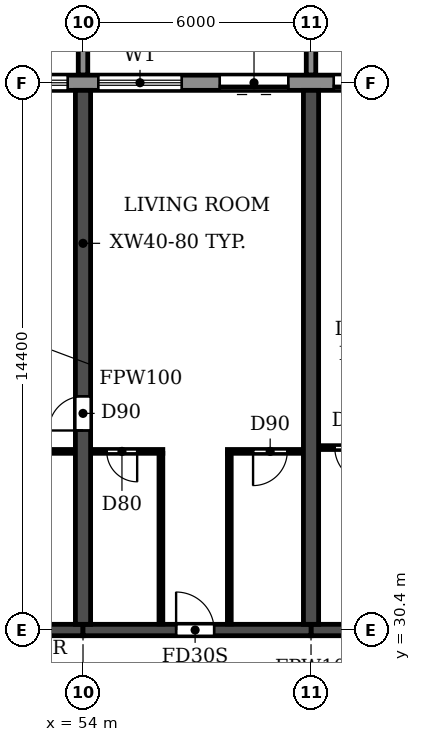
"""IFC4 building model, lengths in metres.
Left out: names, types, materials, properties, quantities, classifications, styles, units other than length and angle.
Written with IfcOpenShell. Run it as: python <this file> out.ifc"""

import sys

from ifc_helpers import new_model, si_unit, direction, frame, frame_2d, origin, place, context, subcontext, project, spatial, polyline, rectangle, outline, extrude, source, transform, mapped, element, fill, save


model = new_model("IFC4")
c1 = context("Model", 3, precision=1e-05, world=origin(), true_north=direction((0.0, 1.0)))
c2 = subcontext(c1, "Body", "Model", "MODEL_VIEW")
j1 = project(units=[si_unit("LENGTHUNIT", "METRE"), si_unit("PLANEANGLEUNIT", "RADIAN")], contexts=[c1])
p1 = place(None, origin())
s1 = spatial("IfcSite", under=j1, at=p1, CompositionType="ELEMENT")
p2 = place(p1, origin())
s2 = spatial("IfcBuilding", under=s1, at=p2, CompositionType="ELEMENT")
p3 = place(p2, frame((0.0, 0.0, 63.0)))
s3 = spatial("IfcBuildingStorey", under=s2, at=p3, CompositionType="ELEMENT", Elevation=63.0)
p4 = place(p3, frame((54.0, 30.55, 0.0), z_axis=(0.0, 0.0, 1.0), x_axis=(0.0, 1.0, 0.0)))
e1 = element("IfcWall", 1, at=p4, inside=s3, PredefinedType="SHEAR", context=c2, shape_type="SweptSolid", body=[
    extrude(rectangle(XDim=14.05, YDim=0.4, at=frame_2d((7.025, 0.0))), origin(), (0.0, 0.0, 1.0), 2.95),
])
p5 = place(p4, frame((5.1, 0.0, 0.0)))
e2 = element("IfcOpeningElement", 2, at=p5, cuts=e1, PredefinedType="OPENING", context=c2, shape_type="SweptSolid", body=[
    extrude(rectangle(XDim=0.9, YDim=2.1, at=frame_2d((0.45, 1.05))), frame((0.0, 0.21, 0.0), z_axis=(0.0, -1.0, 0.0), x_axis=(1.0, 0.0, 0.0)), (0.0, 0.0, 1.0), 0.42),
])
p6 = place(p3, frame((60.0, 30.55, 0.0), z_axis=(0.0, 0.0, 1.0), x_axis=(0.0, 1.0, 0.0)))
e3 = element("IfcWall", 3, at=p6, inside=s3, PredefinedType="SHEAR", context=c2, shape_type="SweptSolid", body=[
    extrude(rectangle(XDim=14.05, YDim=0.4, at=frame_2d((7.025, 0.0))), origin(), (0.0, 0.0, 1.0), 2.95),
])
p7 = place(p3, frame((48.0, 30.4, 0.0), z_axis=(0.0, 0.0, 1.0), x_axis=(1.0, 0.0, 0.0)))
e4 = element("IfcWall", 4, at=p7, inside=s3, PredefinedType="SHEAR", context=c2, shape_type="SweptSolid", body=[
    extrude(rectangle(XDim=6.0, YDim=0.3, at=frame_2d((3.0, 0.0))), origin(), (0.0, 0.0, 1.0), 2.35),
])
p8 = place(p3, frame((54.0, 30.4, 0.0), z_axis=(0.0, 0.0, 1.0), x_axis=(1.0, 0.0, 0.0)))
e5 = element("IfcWall", 5, at=p8, inside=s3, PredefinedType="SHEAR", context=c2, shape_type="SweptSolid", body=[
    extrude(rectangle(XDim=6.0, YDim=0.3, at=frame_2d((3.0, 0.0))), origin(), (0.0, 0.0, 1.0), 2.35),
])
p9 = place(p8, frame((2.45, 0.0, 0.0)))
e6 = element("IfcOpeningElement", 6, at=p9, cuts=e5, PredefinedType="OPENING", context=c2, shape_type="SweptSolid", body=[
    extrude(rectangle(XDim=1.0, YDim=2.1, at=frame_2d((0.5, 1.05))), frame((0.0, 0.16, 0.0), z_axis=(0.0, -1.0, 0.0), x_axis=(1.0, 0.0, 0.0)), (0.0, 0.0, 1.0), 0.32),
])
p10 = place(p3, frame((60.0, 30.4, 0.0), z_axis=(0.0, 0.0, 1.0), x_axis=(1.0, 0.0, 0.0)))
e7 = element("IfcWall", 7, at=p10, inside=s3, PredefinedType="SHEAR", context=c2, shape_type="SweptSolid", body=[
    extrude(rectangle(XDim=6.0, YDim=0.3, at=frame_2d((3.0, 0.0))), origin(), (0.0, 0.0, 1.0), 2.35),
])
p11 = place(p10, frame((2.55, 0.0, 0.0)))
e8 = element("IfcOpeningElement", 8, at=p11, cuts=e7, PredefinedType="OPENING", context=c2, shape_type="SweptSolid", body=[
    extrude(rectangle(XDim=1.0, YDim=2.1, at=frame_2d((0.5, 1.05))), frame((0.0, 0.16, 0.0), z_axis=(0.0, -1.0, 0.0), x_axis=(1.0, 0.0, 0.0)), (0.0, 0.0, 1.0), 0.32),
])
p12 = place(p3, frame((91.317, 44.8, 0.0), z_axis=(0.0, 0.0, 1.0), x_axis=(-1.0, 0.0, 0.0)))
e9 = element("IfcWall", 9, at=p12, inside=s3, PredefinedType="STANDARD", context=c2, shape_type="SweptSolid", body=[
    extrude(rectangle(XDim=80.634, YDim=0.4, at=frame_2d((40.317, 0.0))), origin(), (0.0, 0.0, 1.0), 2.95),
])
p13 = place(p12, frame((76.717, 0.0, 0.9)))
e10 = element("IfcOpeningElement", 10, at=p13, cuts=e9, PredefinedType="OPENING", context=c2, shape_type="SweptSolid", body=[
    extrude(rectangle(XDim=2.2, YDim=1.5, at=frame_2d((1.1, 0.75))), frame((0.0, 0.21, 0.0), z_axis=(0.0, -1.0, 0.0), x_axis=(1.0, 0.0, 0.0)), (0.0, 0.0, 1.0), 0.42),
])
p14 = place(p12, frame((73.917, 0.0, 0.0)))
e11 = element("IfcOpeningElement", 11, at=p14, cuts=e9, PredefinedType="OPENING", context=c2, shape_type="SweptSolid", body=[
    extrude(rectangle(XDim=1.8, YDim=2.4, at=frame_2d((0.9, 1.2))), frame((0.0, 0.21, 0.0), z_axis=(0.0, -1.0, 0.0), x_axis=(1.0, 0.0, 0.0)), (0.0, 0.0, 1.0), 0.42),
])
p15 = place(p12, frame((70.717, 0.0, 0.9)))
e12 = element("IfcOpeningElement", 12, at=p15, cuts=e9, PredefinedType="OPENING", context=c2, shape_type="SweptSolid", body=[
    extrude(rectangle(XDim=2.2, YDim=1.5, at=frame_2d((1.1, 0.75))), frame((0.0, 0.21, 0.0), z_axis=(0.0, -1.0, 0.0), x_axis=(1.0, 0.0, 0.0)), (0.0, 0.0, 1.0), 0.42),
])
p16 = place(p12, frame((67.917, 0.0, 0.0)))
e13 = element("IfcOpeningElement", 13, at=p16, cuts=e9, PredefinedType="OPENING", context=c2, shape_type="SweptSolid", body=[
    extrude(rectangle(XDim=1.8, YDim=2.4, at=frame_2d((0.9, 1.2))), frame((0.0, 0.21, 0.0), z_axis=(0.0, -1.0, 0.0), x_axis=(1.0, 0.0, 0.0)), (0.0, 0.0, 1.0), 0.42),
])
p17 = place(p12, frame((64.717, 0.0, 0.9)))
e14 = element("IfcOpeningElement", 14, at=p17, cuts=e9, PredefinedType="OPENING", context=c2, shape_type="SweptSolid", body=[
    extrude(rectangle(XDim=2.2, YDim=1.5, at=frame_2d((1.1, 0.75))), frame((0.0, 0.21, 0.0), z_axis=(0.0, -1.0, 0.0), x_axis=(1.0, 0.0, 0.0)), (0.0, 0.0, 1.0), 0.42),
])
p18 = place(p12, frame((61.917, 0.0, 0.0)))
e15 = element("IfcOpeningElement", 15, at=p18, cuts=e9, PredefinedType="OPENING", context=c2, shape_type="SweptSolid", body=[
    extrude(rectangle(XDim=1.8, YDim=2.4, at=frame_2d((0.9, 1.2))), frame((0.0, 0.21, 0.0), z_axis=(0.0, -1.0, 0.0), x_axis=(1.0, 0.0, 0.0)), (0.0, 0.0, 1.0), 0.42),
])
p19 = place(p12, frame((58.717, 0.0, 0.9)))
e16 = element("IfcOpeningElement", 16, at=p19, cuts=e9, PredefinedType="OPENING", context=c2, shape_type="SweptSolid", body=[
    extrude(rectangle(XDim=2.2, YDim=1.5, at=frame_2d((1.1, 0.75))), frame((0.0, 0.21, 0.0), z_axis=(0.0, -1.0, 0.0), x_axis=(1.0, 0.0, 0.0)), (0.0, 0.0, 1.0), 0.42),
])
p20 = place(p12, frame((55.717, 0.0, 0.9)))
e17 = element("IfcOpeningElement", 17, at=p20, cuts=e9, PredefinedType="OPENING", context=c2, shape_type="SweptSolid", body=[
    extrude(rectangle(XDim=2.2, YDim=1.5, at=frame_2d((1.1, 0.75))), frame((0.0, 0.21, 0.0), z_axis=(0.0, -1.0, 0.0), x_axis=(1.0, 0.0, 0.0)), (0.0, 0.0, 1.0), 0.42),
])
p21 = place(p12, frame((52.917, 0.0, 0.0)))
e18 = element("IfcOpeningElement", 18, at=p21, cuts=e9, PredefinedType="OPENING", context=c2, shape_type="SweptSolid", body=[
    extrude(rectangle(XDim=1.8, YDim=2.4, at=frame_2d((0.9, 1.2))), frame((0.0, 0.21, 0.0), z_axis=(0.0, -1.0, 0.0), x_axis=(1.0, 0.0, 0.0)), (0.0, 0.0, 1.0), 0.42),
])
p22 = place(p12, frame((49.717, 0.0, 0.9)))
e19 = element("IfcOpeningElement", 19, at=p22, cuts=e9, PredefinedType="OPENING", context=c2, shape_type="SweptSolid", body=[
    extrude(rectangle(XDim=2.2, YDim=1.5, at=frame_2d((1.1, 0.75))), frame((0.0, 0.21, 0.0), z_axis=(0.0, -1.0, 0.0), x_axis=(1.0, 0.0, 0.0)), (0.0, 0.0, 1.0), 0.42),
])
p23 = place(p12, frame((46.917, 0.0, 0.0)))
e20 = element("IfcOpeningElement", 20, at=p23, cuts=e9, PredefinedType="OPENING", context=c2, shape_type="SweptSolid", body=[
    extrude(rectangle(XDim=1.8, YDim=2.4, at=frame_2d((0.9, 1.2))), frame((0.0, 0.21, 0.0), z_axis=(0.0, -1.0, 0.0), x_axis=(1.0, 0.0, 0.0)), (0.0, 0.0, 1.0), 0.42),
])
p24 = place(p12, frame((43.717, 0.0, 0.9)))
e21 = element("IfcOpeningElement", 21, at=p24, cuts=e9, PredefinedType="OPENING", context=c2, shape_type="SweptSolid", body=[
    extrude(rectangle(XDim=2.2, YDim=1.5, at=frame_2d((1.1, 0.75))), frame((0.0, 0.21, 0.0), z_axis=(0.0, -1.0, 0.0), x_axis=(1.0, 0.0, 0.0)), (0.0, 0.0, 1.0), 0.42),
])
p25 = place(p12, frame((40.717, 0.0, 0.9)))
e22 = element("IfcOpeningElement", 22, at=p25, cuts=e9, PredefinedType="OPENING", context=c2, shape_type="SweptSolid", body=[
    extrude(rectangle(XDim=2.2, YDim=1.5, at=frame_2d((1.1, 0.75))), frame((0.0, 0.21, 0.0), z_axis=(0.0, -1.0, 0.0), x_axis=(1.0, 0.0, 0.0)), (0.0, 0.0, 1.0), 0.42),
])
p26 = place(p12, frame((37.717, 0.0, 0.9)))
e23 = element("IfcOpeningElement", 23, at=p26, cuts=e9, PredefinedType="OPENING", context=c2, shape_type="SweptSolid", body=[
    extrude(rectangle(XDim=2.2, YDim=1.5, at=frame_2d((1.1, 0.75))), frame((0.0, 0.21, 0.0), z_axis=(0.0, -1.0, 0.0), x_axis=(1.0, 0.0, 0.0)), (0.0, 0.0, 1.0), 0.42),
])
p27 = place(p12, frame((34.717, 0.0, 0.9)))
e24 = element("IfcOpeningElement", 24, at=p27, cuts=e9, PredefinedType="OPENING", context=c2, shape_type="SweptSolid", body=[
    extrude(rectangle(XDim=2.2, YDim=1.5, at=frame_2d((1.1, 0.75))), frame((0.0, 0.21, 0.0), z_axis=(0.0, -1.0, 0.0), x_axis=(1.0, 0.0, 0.0)), (0.0, 0.0, 1.0), 0.42),
])
p28 = place(p12, frame((31.917, 0.0, 0.0)))
e25 = element("IfcOpeningElement", 25, at=p28, cuts=e9, PredefinedType="OPENING", context=c2, shape_type="SweptSolid", body=[
    extrude(rectangle(XDim=1.8, YDim=2.4, at=frame_2d((0.9, 1.2))), frame((0.0, 0.21, 0.0), z_axis=(0.0, -1.0, 0.0), x_axis=(1.0, 0.0, 0.0)), (0.0, 0.0, 1.0), 0.42),
])
p29 = place(p12, frame((28.917, 0.0, 0.0)))
e26 = element("IfcOpeningElement", 26, at=p29, cuts=e9, PredefinedType="OPENING", context=c2, shape_type="SweptSolid", body=[
    extrude(rectangle(XDim=1.8, YDim=2.4, at=frame_2d((0.9, 1.2))), frame((0.0, 0.21, 0.0), z_axis=(0.0, -1.0, 0.0), x_axis=(1.0, 0.0, 0.0)), (0.0, 0.0, 1.0), 0.42),
])
p30 = place(p12, frame((25.717, 0.0, 0.9)))
e27 = element("IfcOpeningElement", 27, at=p30, cuts=e9, PredefinedType="OPENING", context=c2, shape_type="SweptSolid", body=[
    extrude(rectangle(XDim=2.2, YDim=1.5, at=frame_2d((1.1, 0.75))), frame((0.0, 0.21, 0.0), z_axis=(0.0, -1.0, 0.0), x_axis=(1.0, 0.0, 0.0)), (0.0, 0.0, 1.0), 0.42),
])
p31 = place(p12, frame((22.917, 0.0, 0.0)))
e28 = element("IfcOpeningElement", 28, at=p31, cuts=e9, PredefinedType="OPENING", context=c2, shape_type="SweptSolid", body=[
    extrude(rectangle(XDim=1.8, YDim=2.4, at=frame_2d((0.9, 1.2))), frame((0.0, 0.21, 0.0), z_axis=(0.0, -1.0, 0.0), x_axis=(1.0, 0.0, 0.0)), (0.0, 0.0, 1.0), 0.42),
])
p32 = place(p12, frame((19.717, 0.0, 0.9)))
e29 = element("IfcOpeningElement", 29, at=p32, cuts=e9, PredefinedType="OPENING", context=c2, shape_type="SweptSolid", body=[
    extrude(rectangle(XDim=2.2, YDim=1.5, at=frame_2d((1.1, 0.75))), frame((0.0, 0.21, 0.0), z_axis=(0.0, -1.0, 0.0), x_axis=(1.0, 0.0, 0.0)), (0.0, 0.0, 1.0), 0.42),
])
p33 = place(p12, frame((16.917, 0.0, 0.0)))
e30 = element("IfcOpeningElement", 30, at=p33, cuts=e9, PredefinedType="OPENING", context=c2, shape_type="SweptSolid", body=[
    extrude(rectangle(XDim=1.8, YDim=2.4, at=frame_2d((0.9, 1.2))), frame((0.0, 0.21, 0.0), z_axis=(0.0, -1.0, 0.0), x_axis=(1.0, 0.0, 0.0)), (0.0, 0.0, 1.0), 0.42),
])
p34 = place(p12, frame((13.717, 0.0, 0.9)))
e31 = element("IfcOpeningElement", 31, at=p34, cuts=e9, PredefinedType="OPENING", context=c2, shape_type="SweptSolid", body=[
    extrude(rectangle(XDim=2.2, YDim=1.5, at=frame_2d((1.1, 0.75))), frame((0.0, 0.21, 0.0), z_axis=(0.0, -1.0, 0.0), x_axis=(1.0, 0.0, 0.0)), (0.0, 0.0, 1.0), 0.42),
])
p35 = place(p12, frame((10.917, 0.0, 0.0)))
e32 = element("IfcOpeningElement", 32, at=p35, cuts=e9, PredefinedType="OPENING", context=c2, shape_type="SweptSolid", body=[
    extrude(rectangle(XDim=1.8, YDim=2.4, at=frame_2d((0.9, 1.2))), frame((0.0, 0.21, 0.0), z_axis=(0.0, -1.0, 0.0), x_axis=(1.0, 0.0, 0.0)), (0.0, 0.0, 1.0), 0.42),
])
p36 = place(p12, frame((7.717, 0.0, 0.9)))
e33 = element("IfcOpeningElement", 33, at=p36, cuts=e9, PredefinedType="OPENING", context=c2, shape_type="SweptSolid", body=[
    extrude(rectangle(XDim=2.2, YDim=1.5, at=frame_2d((1.1, 0.75))), frame((0.0, 0.21, 0.0), z_axis=(0.0, -1.0, 0.0), x_axis=(1.0, 0.0, 0.0)), (0.0, 0.0, 1.0), 0.42),
])
p37 = place(p12, frame((4.717, 0.0, 0.9)))
e34 = element("IfcOpeningElement", 34, at=p37, cuts=e9, PredefinedType="OPENING", context=c2, shape_type="SweptSolid", body=[
    extrude(rectangle(XDim=2.2, YDim=1.5, at=frame_2d((1.1, 0.75))), frame((0.0, 0.21, 0.0), z_axis=(0.0, -1.0, 0.0), x_axis=(1.0, 0.0, 0.0)), (0.0, 0.0, 1.0), 0.42),
])
p38 = place(p12, frame((1.717, 0.0, 0.9)))
e35 = element("IfcOpeningElement", 35, at=p38, cuts=e9, PredefinedType="OPENING", context=c2, shape_type="SweptSolid", body=[
    extrude(rectangle(XDim=2.2, YDim=1.5, at=frame_2d((1.1, 0.75))), frame((0.0, 0.21, 0.0), z_axis=(0.0, -1.0, 0.0), x_axis=(1.0, 0.0, 0.0)), (0.0, 0.0, 1.0), 0.42),
])
m1 = source(origin(), c2, "Body", "SweptSolid", [
    extrude(outline(polyline([(0.0, 0.0), (0.25, 0.0), (0.25, 3.1), (0.0, 3.1), (0.0, 0.0)])), origin(), (0.0, 0.0, 1.0), 3.1),
])
for number, where in (
    (36, (53.875, 45.0, 0.0)),
    (37, (59.875, 45.0, 0.0)),
):
    element("IfcWall", number, at=place(p3, frame(where)), inside=s3, PredefinedType="STANDARD", context=c2, shape_type="MappedRepresentation", body=[
        mapped(m1, transform((0.0, 0.0, 0.0))),
    ])
p39 = place(p3, frame((51.1, 35.1, 0.0), z_axis=(0.0, 0.0, 1.0), x_axis=(1.0, 0.0, 0.0)))
e38 = element("IfcWall", 38, at=p39, inside=s3, PredefinedType="PARTITIONING", context=c2, shape_type="SweptSolid", body=[
    extrude(rectangle(XDim=2.69, YDim=0.1, at=frame_2d((1.345, 0.0))), origin(), (0.0, 0.0, 1.0), 2.95),
])
p40 = place(p39, frame((1.0, 0.0, 0.0)))
e39 = element("IfcOpeningElement", 39, at=p40, cuts=e38, PredefinedType="OPENING", context=c2, shape_type="SweptSolid", body=[
    extrude(rectangle(XDim=0.8, YDim=2.1, at=frame_2d((0.4, 1.05))), frame((0.0, 0.06, 0.0), z_axis=(0.0, -1.0, 0.0), x_axis=(1.0, 0.0, 0.0)), (0.0, 0.0, 1.0), 0.12),
])
p41 = place(p3, frame((54.21, 35.1, 0.0), z_axis=(0.0, 0.0, 1.0), x_axis=(1.0, 0.0, 0.0)))
e40 = element("IfcWall", 40, at=p41, inside=s3, PredefinedType="PARTITIONING", context=c2, shape_type="SweptSolid", body=[
    extrude(rectangle(XDim=1.89, YDim=0.1, at=frame_2d((0.945, 0.0))), origin(), (0.0, 0.0, 1.0), 2.95),
])
p42 = place(p41, frame((0.415, 0.0, 0.0)))
e41 = element("IfcOpeningElement", 41, at=p42, cuts=e40, PredefinedType="OPENING", context=c2, shape_type="SweptSolid", body=[
    extrude(rectangle(XDim=0.8, YDim=2.1, at=frame_2d((0.4, 1.05))), frame((0.0, 0.06, 0.0), z_axis=(0.0, -1.0, 0.0), x_axis=(1.0, 0.0, 0.0)), (0.0, 0.0, 1.0), 0.12),
])
p43 = place(p3, frame((57.8, 35.1, 0.0), z_axis=(0.0, 0.0, 1.0), x_axis=(1.0, 0.0, 0.0)))
e42 = element("IfcWall", 42, at=p43, inside=s3, PredefinedType="PARTITIONING", context=c2, shape_type="SweptSolid", body=[
    extrude(rectangle(XDim=1.99, YDim=0.1, at=frame_2d((0.995, 0.0))), origin(), (0.0, 0.0, 1.0), 2.95),
])
p44 = place(p43, frame((0.675, 0.0, 0.0)))
e43 = element("IfcOpeningElement", 43, at=p44, cuts=e42, PredefinedType="OPENING", context=c2, shape_type="SweptSolid", body=[
    extrude(rectangle(XDim=0.9, YDim=2.1, at=frame_2d((0.45, 1.05))), frame((0.0, 0.06, 0.0), z_axis=(0.0, -1.0, 0.0), x_axis=(1.0, 0.0, 0.0)), (0.0, 0.0, 1.0), 0.12),
])
p45 = place(p3, frame((60.21, 35.2, 0.0), z_axis=(0.0, 0.0, 1.0), x_axis=(1.0, 0.0, 0.0)))
e44 = element("IfcWall", 44, at=p45, inside=s3, PredefinedType="PARTITIONING", context=c2, shape_type="SweptSolid", body=[
    extrude(rectangle(XDim=1.99, YDim=0.1, at=frame_2d((0.995, 0.0))), origin(), (0.0, 0.0, 1.0), 2.95),
])
p46 = place(p45, frame((0.415, 0.0, 0.0)))
e45 = element("IfcOpeningElement", 45, at=p46, cuts=e44, PredefinedType="OPENING", context=c2, shape_type="SweptSolid", body=[
    extrude(rectangle(XDim=0.9, YDim=2.1, at=frame_2d((0.45, 1.05))), frame((0.0, 0.06, 0.0), z_axis=(0.0, -1.0, 0.0), x_axis=(1.0, 0.0, 0.0)), (0.0, 0.0, 1.0), 0.12),
])
for number, where, z_axis, x_axis in (
    (46, (56.05, 30.56, 0.0), (0.0, 0.0, 1.0), (0.0, 1.0, 0.0)),
    (47, (57.85, 30.56, 0.0), (0.0, 0.0, 1.0), (0.0, 1.0, 0.0)),
):
    element("IfcWall", number, at=place(p3, frame(where, z_axis=z_axis, x_axis=x_axis)), inside=s3, PredefinedType="PARTITIONING", context=c2, shape_type="SweptSolid", body=[
        extrude(rectangle(XDim=4.49, YDim=0.1, at=frame_2d((2.245, 0.0))), origin(), (0.0, 0.0, 1.0), 2.95),
    ])
p47 = place(p26, origin())
e48 = element("IfcWindow", 48, at=p47, inside=s3, PartitioningType="DOUBLE_PANEL_HORIZONTAL", PredefinedType="WINDOW", context=c2, shape_type="SweptSolid", body=[
    extrude(rectangle(XDim=2.2, YDim=1.5, at=frame_2d((1.1, 0.75))), frame((0.0, 0.03, 0.0), z_axis=(0.0, -1.0, 0.0), x_axis=(1.0, 0.0, 0.0)), (0.0, 0.0, 1.0), 0.06),
])
fill(e23, e48)
p48 = place(p27, origin())
e49 = element("IfcWindow", 49, at=p48, inside=s3, PartitioningType="DOUBLE_PANEL_HORIZONTAL", PredefinedType="WINDOW", context=c2, shape_type="SweptSolid", body=[
    extrude(rectangle(XDim=2.2, YDim=1.5, at=frame_2d((1.1, 0.75))), frame((0.0, 0.03, 0.0), z_axis=(0.0, -1.0, 0.0), x_axis=(1.0, 0.0, 0.0)), (0.0, 0.0, 1.0), 0.06),
])
fill(e24, e49)
p49 = place(p28, origin())
e50 = element("IfcDoor", 50, at=p49, inside=s3, OperationType="DOUBLE_DOOR_SLIDING", PredefinedType="DOOR", context=c2, shape_type="SweptSolid", body=[
    extrude(rectangle(XDim=1.8, YDim=2.4, at=frame_2d((0.9, 1.2))), frame((0.0, 0.025, 0.0), z_axis=(0.0, -1.0, 0.0), x_axis=(1.0, 0.0, 0.0)), (0.0, 0.0, 1.0), 0.05),
])
fill(e25, e50)
p50 = place(p29, origin())
e51 = element("IfcDoor", 51, at=p50, inside=s3, OperationType="DOUBLE_DOOR_SLIDING", PredefinedType="DOOR", context=c2, shape_type="SweptSolid", body=[
    extrude(rectangle(XDim=1.8, YDim=2.4, at=frame_2d((0.9, 1.2))), frame((0.0, 0.025, 0.0), z_axis=(0.0, -1.0, 0.0), x_axis=(1.0, 0.0, 0.0)), (0.0, 0.0, 1.0), 0.05),
])
fill(e26, e51)
p51 = place(p5, origin())
e52 = element("IfcDoor", 52, at=p51, inside=s3, OperationType="SINGLE_SWING_LEFT", PredefinedType="DOOR", context=c2, shape_type="SweptSolid", body=[
    extrude(rectangle(XDim=0.9, YDim=2.1, at=frame_2d((0.45, 1.05))), frame((0.0, 0.025, 0.0), z_axis=(0.0, -1.0, 0.0), x_axis=(1.0, 0.0, 0.0)), (0.0, 0.0, 1.0), 0.05),
])
fill(e2, e52)
p52 = place(p42, frame((0.8, 0.0, 0.0), z_axis=(0.0, 0.0, 1.0), x_axis=(-1.0, 0.0, 0.0)))
e53 = element("IfcDoor", 53, at=p52, inside=s3, OperationType="SINGLE_SWING_LEFT", PredefinedType="DOOR", context=c2, shape_type="SweptSolid", body=[
    extrude(rectangle(XDim=0.8, YDim=2.1, at=frame_2d((0.4, 1.05))), frame((0.0, 0.025, 0.0), z_axis=(0.0, -1.0, 0.0), x_axis=(1.0, 0.0, 0.0)), (0.0, 0.0, 1.0), 0.05),
])
fill(e41, e53)
p53 = place(p9, origin())
e54 = element("IfcDoor", 54, at=p53, inside=s3, OperationType="SINGLE_SWING_LEFT", PredefinedType="DOOR", context=c2, shape_type="SweptSolid", body=[
    extrude(rectangle(XDim=1.0, YDim=2.1, at=frame_2d((0.5, 1.05))), frame((0.0, 0.025, 0.0), z_axis=(0.0, -1.0, 0.0), x_axis=(1.0, 0.0, 0.0)), (0.0, 0.0, 1.0), 0.05),
])
fill(e6, e54)
p54 = place(p44, frame((0.9, 0.0, 0.0), z_axis=(0.0, 0.0, 1.0), x_axis=(-1.0, 0.0, 0.0)))
e55 = element("IfcDoor", 55, at=p54, inside=s3, OperationType="SINGLE_SWING_RIGHT", PredefinedType="DOOR", context=c2, shape_type="SweptSolid", body=[
    extrude(rectangle(XDim=0.9, YDim=2.1, at=frame_2d((0.45, 1.05))), frame((0.0, 0.025, 0.0), z_axis=(0.0, -1.0, 0.0), x_axis=(1.0, 0.0, 0.0)), (0.0, 0.0, 1.0), 0.05),
])
fill(e43, e55)
p55 = place(p46, frame((0.9, 0.0, 0.0), z_axis=(0.0, 0.0, 1.0), x_axis=(-1.0, 0.0, 0.0)))
e56 = element("IfcDoor", 56, at=p55, inside=s3, OperationType="SINGLE_SWING_LEFT", PredefinedType="DOOR", context=c2, shape_type="SweptSolid", body=[
    extrude(rectangle(XDim=0.9, YDim=2.1, at=frame_2d((0.45, 1.05))), frame((0.0, 0.025, 0.0), z_axis=(0.0, -1.0, 0.0), x_axis=(1.0, 0.0, 0.0)), (0.0, 0.0, 1.0), 0.05),
])
fill(e45, e56)
save(model, sys.argv[1])
